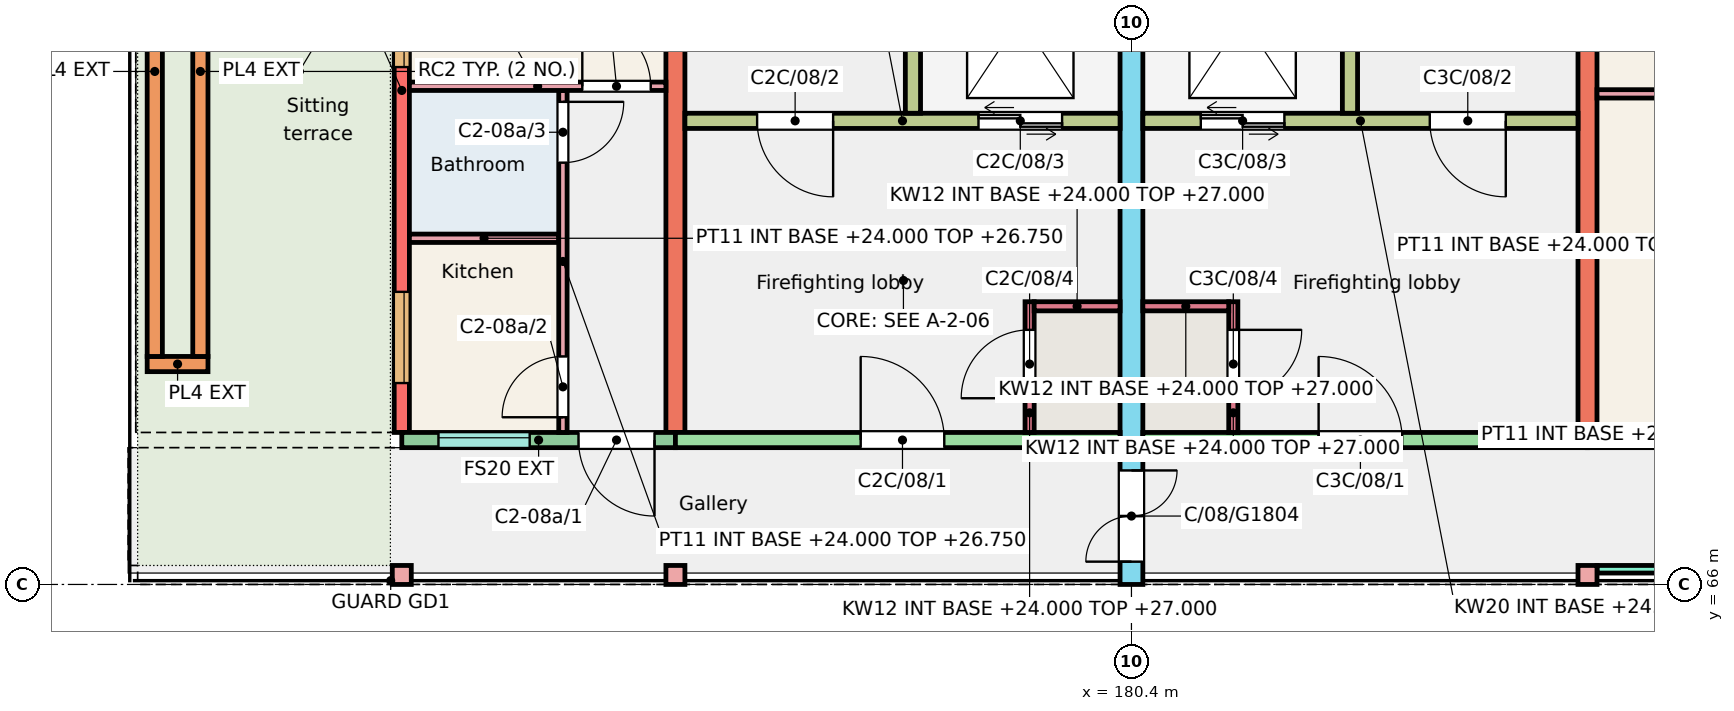
"""IFC4 building model, lengths in metres.
Left out: names, types, materials, properties, quantities, classifications, styles, units other than length and angle.
Written with IfcOpenShell. Run it as: python <this file> out.ifc"""

import sys

from ifc_helpers import new_model, si_unit, direction, frame, frame_2d, origin, origin_2d, place, context, subcontext, project, spatial, rectangle, extrude, element, fill, save


model = new_model("IFC4")
c1 = context("Model", 3, precision=1e-05, world=origin(), true_north=direction((0.0, 1.0)))
c2 = subcontext(c1, "Body", "Model", "MODEL_VIEW")
j1 = project(units=[si_unit("LENGTHUNIT", "METRE"), si_unit("PLANEANGLEUNIT", "RADIAN")], contexts=[c1])
p1 = place(None, origin())
s1 = spatial("IfcSite", under=j1, at=p1, CompositionType="ELEMENT")
p2 = place(p1, origin())
s2 = spatial("IfcBuilding", under=s1, at=p2, CompositionType="ELEMENT")
p3 = place(p2, frame((0.0, 0.0, 24.0)))
s3 = spatial("IfcBuildingStorey", under=s2, at=p3, CompositionType="ELEMENT", Elevation=24.0)
p4 = place(p3, frame((170.8, 68.0, 0.0), z_axis=(0.0, 0.0, 1.0), x_axis=(0.0, 1.0, 0.0)))
e1 = element("IfcWall", 1, at=p4, inside=s3, PredefinedType="SHEAR", context=c2, shape_type="SweptSolid", body=[
    extrude(rectangle(XDim=9.0, YDim=0.2, at=frame_2d((4.5, 0.0))), origin(), (0.0, 0.0, 1.0), 3.0),
])
p5 = place(p4, frame((0.65, 0.0, 0.9)))
e2 = element("IfcOpeningElement", 2, at=p5, cuts=e1, PredefinedType="OPENING", context=c2, shape_type="SweptSolid", body=[
    extrude(rectangle(XDim=1.2, YDim=1.5, at=frame_2d((0.6, 0.75))), frame((0.0, 0.11, 0.0), z_axis=(0.0, -1.0, 0.0), x_axis=(1.0, 0.0, 0.0)), (0.0, 0.0, 1.0), 0.22),
])
p6 = place(p4, frame((4.808, 0.0, 0.9)))
e3 = element("IfcOpeningElement", 3, at=p6, cuts=e1, PredefinedType="OPENING", context=c2, shape_type="SweptSolid", body=[
    extrude(rectangle(XDim=1.2, YDim=1.5, at=frame_2d((0.6, 0.75))), frame((0.0, 0.11, 0.0), z_axis=(0.0, -1.0, 0.0), x_axis=(1.0, 0.0, 0.0)), (0.0, 0.0, 1.0), 0.22),
])
p7 = place(p4, frame((6.305, 0.0, 0.0)))
e4 = element("IfcOpeningElement", 4, at=p7, cuts=e1, PredefinedType="OPENING", context=c2, shape_type="SweptSolid", body=[
    extrude(rectangle(XDim=1.0, YDim=2.1, at=frame_2d((0.5, 1.05))), frame((0.0, 0.11, 0.0), z_axis=(0.0, -1.0, 0.0), x_axis=(1.0, 0.0, 0.0)), (0.0, 0.0, 1.0), 0.22),
])
p8 = place(p3, frame((174.4, 68.0, 0.0), z_axis=(0.0, 0.0, 1.0), x_axis=(0.0, 1.0, 0.0)))
e5 = element("IfcWall", 5, at=p8, inside=s3, PredefinedType="SHEAR", context=c2, shape_type="SweptSolid", body=[
    extrude(rectangle(XDim=9.0, YDim=0.25, at=frame_2d((4.5, 0.0))), origin(), (0.0, 0.0, 1.0), 3.0),
])
p9 = place(p3, frame((180.4, 66.0, 0.0), z_axis=(0.0, 0.0, 1.0), x_axis=(0.0, 1.0, 0.0)))
e6 = element("IfcWall", 6, at=p9, inside=s3, PredefinedType="SHEAR", context=c2, shape_type="SweptSolid", body=[
    extrude(rectangle(XDim=11.0, YDim=0.3, at=frame_2d((5.5, 0.0))), origin(), (0.0, 0.0, 1.0), 3.0),
])
p10 = place(p9, frame((0.3, 0.0, 0.0)))
e7 = element("IfcOpeningElement", 7, at=p10, cuts=e6, PredefinedType="OPENING", context=c2, shape_type="SweptSolid", body=[
    extrude(rectangle(XDim=1.2, YDim=2.1, at=frame_2d((0.6, 1.05))), frame((0.0, 0.16, 0.0), z_axis=(0.0, -1.0, 0.0), x_axis=(1.0, 0.0, 0.0)), (0.0, 0.0, 1.0), 0.32),
])
p11 = place(p3, frame((186.4, 68.0, 0.0), z_axis=(0.0, 0.0, 1.0), x_axis=(0.0, 1.0, 0.0)))
e8 = element("IfcWall", 8, at=p11, inside=s3, PredefinedType="SHEAR", context=c2, shape_type="SweptSolid", body=[
    extrude(rectangle(XDim=9.0, YDim=0.25, at=frame_2d((4.5, 0.0))), origin(), (0.0, 0.0, 1.0), 3.0),
])
p12 = place(p3, frame((170.8, 67.9, 0.0), z_axis=(0.0, 0.0, 1.0), x_axis=(1.0, 0.0, 0.0)))
e9 = element("IfcWall", 9, at=p12, inside=s3, PredefinedType="SOLIDWALL", context=c2, shape_type="SweptSolid", body=[
    extrude(rectangle(XDim=3.6, YDim=0.2, at=frame_2d((1.8, 0.0))), origin(), (0.0, 0.0, 1.0), 3.0),
])
p13 = place(p12, frame((0.482, 0.0, 1.1)))
e10 = element("IfcOpeningElement", 10, at=p13, cuts=e9, PredefinedType="OPENING", context=c2, shape_type="SweptSolid", body=[
    extrude(rectangle(XDim=1.2, YDim=1.3, at=frame_2d((0.6, 0.65))), frame((0.0, 0.11, 0.0), z_axis=(0.0, -1.0, 0.0), x_axis=(1.0, 0.0, 0.0)), (0.0, 0.0, 1.0), 0.22),
])
p14 = place(p12, frame((2.325, 0.0, 0.0)))
e11 = element("IfcOpeningElement", 11, at=p14, cuts=e9, PredefinedType="OPENING", context=c2, shape_type="SweptSolid", body=[
    extrude(rectangle(XDim=1.0, YDim=2.1, at=frame_2d((0.5, 1.05))), frame((0.0, 0.11, 0.0), z_axis=(0.0, -1.0, 0.0), x_axis=(1.0, 0.0, 0.0)), (0.0, 0.0, 1.0), 0.22),
])
p15 = place(p3, frame((174.4, 67.9, 0.0), z_axis=(0.0, 0.0, 1.0), x_axis=(1.0, 0.0, 0.0)))
e12 = element("IfcWall", 12, at=p15, inside=s3, PredefinedType="SHEAR", context=c2, shape_type="SweptSolid", body=[
    extrude(rectangle(XDim=5.85, YDim=0.2, at=frame_2d((2.925, 0.0))), origin(), (0.0, 0.0, 1.0), 3.0),
])
p16 = place(p15, frame((2.438, 0.0, 0.0)))
e13 = element("IfcOpeningElement", 13, at=p16, cuts=e12, PredefinedType="OPENING", context=c2, shape_type="SweptSolid", body=[
    extrude(rectangle(XDim=1.1, YDim=2.1, at=frame_2d((0.55, 1.05))), frame((0.0, 0.11, 0.0), z_axis=(0.0, -1.0, 0.0), x_axis=(1.0, 0.0, 0.0)), (0.0, 0.0, 1.0), 0.22),
])
p17 = place(p3, frame((174.525, 72.1, 0.0), z_axis=(0.0, 0.0, 1.0), x_axis=(1.0, 0.0, 0.0)))
e14 = element("IfcWall", 14, at=p17, inside=s3, PredefinedType="SHEAR", context=c2, shape_type="SweptSolid", body=[
    extrude(rectangle(XDim=5.725, YDim=0.2, at=frame_2d((2.863, 0.0))), origin(), (0.0, 0.0, 1.0), 3.0),
])
p18 = place(p17, frame((0.95, 0.0, 0.0)))
e15 = element("IfcOpeningElement", 15, at=p18, cuts=e14, PredefinedType="OPENING", context=c2, shape_type="SweptSolid", body=[
    extrude(rectangle(XDim=1.0, YDim=2.1, at=frame_2d((0.5, 1.05))), frame((0.0, 0.11, 0.0), z_axis=(0.0, -1.0, 0.0), x_axis=(1.0, 0.0, 0.0)), (0.0, 0.0, 1.0), 0.22),
])
p19 = place(p17, frame((3.863, 0.0, 0.0)))
e16 = element("IfcOpeningElement", 16, at=p19, cuts=e14, PredefinedType="OPENING", context=c2, shape_type="SweptSolid", body=[
    extrude(rectangle(XDim=1.1, YDim=2.1, at=frame_2d((0.55, 1.05))), frame((0.0, 0.11, 0.0), z_axis=(0.0, -1.0, 0.0), x_axis=(1.0, 0.0, 0.0)), (0.0, 0.0, 1.0), 0.22),
])
p20 = place(p3, frame((177.525, 72.2, 0.0), z_axis=(0.0, 0.0, 1.0), x_axis=(0.0, 1.0, 0.0)))
e17 = element("IfcWall", 17, at=p20, inside=s3, PredefinedType="SHEAR", context=c2, shape_type="SweptSolid", body=[
    extrude(rectangle(XDim=4.8, YDim=0.2, at=frame_2d((2.4, 0.0))), origin(), (0.0, 0.0, 1.0), 3.0),
])
p21 = place(p3, frame((179.06, 68.0, 0.0), z_axis=(0.0, 0.0, 1.0), x_axis=(0.0, 1.0, 0.0)))
e18 = element("IfcWall", 18, at=p21, inside=s3, PredefinedType="SHEAR", context=c2, shape_type="SweptSolid", body=[
    extrude(rectangle(XDim=1.72, YDim=0.12, at=frame_2d((0.86, 0.0))), origin(), (0.0, 0.0, 1.0), 3.0),
])
p22 = place(p21, frame((0.45, 0.0, 0.0)))
e19 = element("IfcOpeningElement", 19, at=p22, cuts=e18, PredefinedType="OPENING", context=c2, shape_type="SweptSolid", body=[
    extrude(rectangle(XDim=0.9, YDim=2.1, at=frame_2d((0.45, 1.05))), frame((0.0, 0.07, 0.0), z_axis=(0.0, -1.0, 0.0), x_axis=(1.0, 0.0, 0.0)), (0.0, 0.0, 1.0), 0.14),
])
p23 = place(p3, frame((179.12, 69.66, 0.0), z_axis=(0.0, 0.0, 1.0), x_axis=(1.0, 0.0, 0.0)))
e20 = element("IfcWall", 20, at=p23, inside=s3, PredefinedType="SHEAR", context=c2, shape_type="SweptSolid", body=[
    extrude(rectangle(XDim=1.13, YDim=0.12, at=frame_2d((0.565, 0.0))), origin(), (0.0, 0.0, 1.0), 3.0),
])
p24 = place(p3, frame((180.55, 67.9, 0.0), z_axis=(0.0, 0.0, 1.0), x_axis=(1.0, 0.0, 0.0)))
e21 = element("IfcWall", 21, at=p24, inside=s3, PredefinedType="SHEAR", context=c2, shape_type="SweptSolid", body=[
    extrude(rectangle(XDim=5.85, YDim=0.2, at=frame_2d((2.925, 0.0))), origin(), (0.0, 0.0, 1.0), 3.0),
])
p25 = place(p24, frame((2.312, 0.0, 0.0)))
e22 = element("IfcOpeningElement", 22, at=p25, cuts=e21, PredefinedType="OPENING", context=c2, shape_type="SweptSolid", body=[
    extrude(rectangle(XDim=1.1, YDim=2.1, at=frame_2d((0.55, 1.05))), frame((0.0, 0.11, 0.0), z_axis=(0.0, -1.0, 0.0), x_axis=(1.0, 0.0, 0.0)), (0.0, 0.0, 1.0), 0.22),
])
p26 = place(p3, frame((180.55, 72.1, 0.0), z_axis=(0.0, 0.0, 1.0), x_axis=(1.0, 0.0, 0.0)))
e23 = element("IfcWall", 23, at=p26, inside=s3, PredefinedType="SHEAR", context=c2, shape_type="SweptSolid", body=[
    extrude(rectangle(XDim=5.725, YDim=0.2, at=frame_2d((2.862, 0.0))), origin(), (0.0, 0.0, 1.0), 3.0),
])
p27 = place(p26, frame((3.775, 0.0, 0.0)))
e24 = element("IfcOpeningElement", 24, at=p27, cuts=e23, PredefinedType="OPENING", context=c2, shape_type="SweptSolid", body=[
    extrude(rectangle(XDim=1.0, YDim=2.1, at=frame_2d((0.5, 1.05))), frame((0.0, 0.11, 0.0), z_axis=(0.0, -1.0, 0.0), x_axis=(1.0, 0.0, 0.0)), (0.0, 0.0, 1.0), 0.22),
])
p28 = place(p26, frame((0.762, 0.0, 0.0)))
e25 = element("IfcOpeningElement", 25, at=p28, cuts=e23, PredefinedType="OPENING", context=c2, shape_type="SweptSolid", body=[
    extrude(rectangle(XDim=1.1, YDim=2.1, at=frame_2d((0.55, 1.05))), frame((0.0, 0.11, 0.0), z_axis=(0.0, -1.0, 0.0), x_axis=(1.0, 0.0, 0.0)), (0.0, 0.0, 1.0), 0.22),
])
p29 = place(p3, frame((183.275, 72.2, 0.0), z_axis=(0.0, 0.0, 1.0), x_axis=(0.0, 1.0, 0.0)))
e26 = element("IfcWall", 26, at=p29, inside=s3, PredefinedType="SHEAR", context=c2, shape_type="SweptSolid", body=[
    extrude(rectangle(XDim=4.8, YDim=0.2, at=frame_2d((2.4, 0.0))), origin(), (0.0, 0.0, 1.0), 3.0),
])
p30 = place(p3, frame((181.74, 68.0, 0.0), z_axis=(0.0, 0.0, 1.0), x_axis=(0.0, 1.0, 0.0)))
e27 = element("IfcWall", 27, at=p30, inside=s3, PredefinedType="SHEAR", context=c2, shape_type="SweptSolid", body=[
    extrude(rectangle(XDim=1.72, YDim=0.12, at=frame_2d((0.86, 0.0))), origin(), (0.0, 0.0, 1.0), 3.0),
])
p31 = place(p30, frame((0.45, 0.0, 0.0)))
e28 = element("IfcOpeningElement", 28, at=p31, cuts=e27, PredefinedType="OPENING", context=c2, shape_type="SweptSolid", body=[
    extrude(rectangle(XDim=0.9, YDim=2.1, at=frame_2d((0.45, 1.05))), frame((0.0, 0.07, 0.0), z_axis=(0.0, -1.0, 0.0), x_axis=(1.0, 0.0, 0.0)), (0.0, 0.0, 1.0), 0.14),
])
p32 = place(p3, frame((180.55, 69.66, 0.0), z_axis=(0.0, 0.0, 1.0), x_axis=(1.0, 0.0, 0.0)))
e29 = element("IfcWall", 29, at=p32, inside=s3, PredefinedType="SHEAR", context=c2, shape_type="SweptSolid", body=[
    extrude(rectangle(XDim=1.13, YDim=0.12, at=frame_2d((0.565, 0.0))), origin(), (0.0, 0.0, 1.0), 3.0),
])
p33 = place(p3, frame((186.4, 67.9, 0.0), z_axis=(0.0, 0.0, 1.0), x_axis=(1.0, 0.0, 0.0)))
e30 = element("IfcWall", 30, at=p33, inside=s3, PredefinedType="SOLIDWALL", context=c2, shape_type="SweptSolid", body=[
    extrude(rectangle(XDim=3.6, YDim=0.2, at=frame_2d((1.8, 0.0))), origin(), (0.0, 0.0, 1.0), 3.0),
])
p34 = place(p33, frame((1.062, 0.0, 0.9)))
e31 = element("IfcOpeningElement", 31, at=p34, cuts=e30, PredefinedType="OPENING", context=c2, shape_type="SweptSolid", body=[
    extrude(rectangle(XDim=1.5, YDim=1.5, at=frame_2d((0.75, 0.75))), frame((0.0, 0.11, 0.0), z_axis=(0.0, -1.0, 0.0), x_axis=(1.0, 0.0, 0.0)), (0.0, 0.0, 1.0), 0.22),
])
for number, where, z_axis, x_axis in (
    (32, (170.8, 66.125, 0.0), (0.0, 0.0, 1.0), (1.0, 0.0, 0.0)),
    (33, (174.4, 66.125, 0.0), (0.0, 0.0, 1.0), (1.0, 0.0, 0.0)),
    (34, (186.4, 66.125, 0.0), (0.0, 0.0, 1.0), (1.0, 0.0, 0.0)),
):
    element("IfcColumn", number, at=place(p3, frame(where, z_axis=z_axis, x_axis=x_axis)), inside=s3, PredefinedType="COLUMN", context=c2, shape_type="SweptSolid", body=[
        extrude(rectangle(XDim=0.25, YDim=0.25, at=origin_2d()), origin(), (0.0, 0.0, 1.0), 3.0),
    ])
p35 = place(p3, frame((167.45, 68.9, 0.01), z_axis=(0.0, 0.0, 1.0), x_axis=(1.0, 0.0, 0.0)))
e35 = element("IfcWall", 35, at=p35, inside=s3, PredefinedType="SOLIDWALL", context=c2, shape_type="SweptSolid", body=[
    extrude(rectangle(XDim=0.8, YDim=0.2, at=frame_2d((0.4, 0.0))), origin(), (0.0, 0.0, 1.0), 0.45),
])
for number, where, z_axis, x_axis in (
    (36, (167.55, 69.0, 0.01), (0.0, 0.0, 1.0), (0.0, 1.0, 0.0)),
    (37, (168.15, 69.0, 0.01), (0.0, 0.0, 1.0), (0.0, 1.0, 0.0)),
):
    element("IfcWall", number, at=place(p3, frame(where, z_axis=z_axis, x_axis=x_axis)), inside=s3, PredefinedType="SOLIDWALL", context=c2, shape_type="SweptSolid", body=[
        extrude(rectangle(XDim=7.5, YDim=0.2, at=frame_2d((3.75, 0.0))), origin(), (0.0, 0.0, 1.0), 0.45),
    ])
p36 = place(p3, frame((186.525, 66.2, 0.0), z_axis=(0.0, 0.0, 1.0), x_axis=(1.0, 0.0, 0.0)))
e38 = element("IfcWall", 38, at=p36, inside=s3, PredefinedType="SOLIDWALL", context=c2, shape_type="SweptSolid", body=[
    extrude(rectangle(XDim=3.35, YDim=0.1, at=frame_2d((1.675, 0.0))), origin(), (0.0, 0.0, 1.0), 2.45),
])
p37 = place(p3, frame((170.9, 70.555, 0.0), z_axis=(0.0, 0.0, 1.0), x_axis=(1.0, 0.0, 0.0)))
e39 = element("IfcWall", 39, at=p37, inside=s3, PredefinedType="PARTITIONING", context=c2, shape_type="SweptSolid", body=[
    extrude(rectangle(XDim=1.965, YDim=0.11, at=frame_2d((0.982, 0.0))), origin(), (0.0, 0.0, 1.0), 2.75),
])
p38 = place(p3, frame((172.92, 68.0, 0.0), z_axis=(0.0, 0.0, 1.0), x_axis=(0.0, 1.0, 0.0)))
e40 = element("IfcWall", 40, at=p38, inside=s3, PredefinedType="PARTITIONING", context=c2, shape_type="SweptSolid", body=[
    extrude(rectangle(XDim=4.5, YDim=0.11, at=frame_2d((2.25, 0.0))), origin(), (0.0, 0.0, 1.0), 2.75),
])
p39 = place(p38, frame((0.2, 0.0, 0.0)))
e41 = element("IfcOpeningElement", 41, at=p39, cuts=e40, PredefinedType="OPENING", context=c2, shape_type="SweptSolid", body=[
    extrude(rectangle(XDim=0.8, YDim=2.1, at=frame_2d((0.4, 1.05))), frame((0.0, 0.065, 0.0), z_axis=(0.0, -1.0, 0.0), x_axis=(1.0, 0.0, 0.0)), (0.0, 0.0, 1.0), 0.13),
])
p40 = place(p38, frame((3.55, 0.0, 0.0)))
e42 = element("IfcOpeningElement", 42, at=p40, cuts=e40, PredefinedType="OPENING", context=c2, shape_type="SweptSolid", body=[
    extrude(rectangle(XDim=0.8, YDim=2.1, at=frame_2d((0.4, 1.05))), frame((0.0, 0.065, 0.0), z_axis=(0.0, -1.0, 0.0), x_axis=(1.0, 0.0, 0.0)), (0.0, 0.0, 1.0), 0.13),
])
p41 = place(p3, frame((170.9, 72.555, 0.0), z_axis=(0.0, 0.0, 1.0), x_axis=(1.0, 0.0, 0.0)))
e43 = element("IfcWall", 43, at=p41, inside=s3, PredefinedType="PARTITIONING", context=c2, shape_type="SweptSolid", body=[
    extrude(rectangle(XDim=3.375, YDim=0.11, at=frame_2d((1.688, 0.0))), origin(), (0.0, 0.0, 1.0), 2.75),
])
p42 = place(p41, frame((2.275, 0.0, 0.0)))
e44 = element("IfcOpeningElement", 44, at=p42, cuts=e43, PredefinedType="OPENING", context=c2, shape_type="SweptSolid", body=[
    extrude(rectangle(XDim=0.9, YDim=2.1, at=frame_2d((0.45, 1.05))), frame((0.0, 0.065, 0.0), z_axis=(0.0, -1.0, 0.0), x_axis=(1.0, 0.0, 0.0)), (0.0, 0.0, 1.0), 0.13),
])
p43 = place(p3, frame((186.525, 72.455, 0.0), z_axis=(0.0, 0.0, 1.0), x_axis=(1.0, 0.0, 0.0)))
e45 = element("IfcWall", 45, at=p43, inside=s3, PredefinedType="PARTITIONING", context=c2, shape_type="SweptSolid", body=[
    extrude(rectangle(XDim=3.375, YDim=0.11, at=frame_2d((1.688, 0.0))), origin(), (0.0, 0.0, 1.0), 2.8),
])
p44 = place(p13, origin())
e46 = element("IfcWindow", 46, at=p44, inside=s3, PartitioningType="SINGLE_PANEL", PredefinedType="WINDOW", context=c2, shape_type="SweptSolid", body=[
    extrude(rectangle(XDim=1.2, YDim=1.3, at=frame_2d((0.6, 0.65))), frame((0.0, 0.06, 0.0), z_axis=(0.0, -1.0, 0.0), x_axis=(1.0, 0.0, 0.0)), (0.0, 0.0, 1.0), 0.06),
])
fill(e10, e46)
p45 = place(p5, origin())
e47 = element("IfcWindow", 47, at=p45, inside=s3, PartitioningType="SINGLE_PANEL", PredefinedType="WINDOW", context=c2, shape_type="SweptSolid", body=[
    extrude(rectangle(XDim=1.2, YDim=1.5, at=frame_2d((0.6, 0.75))), frame((0.0, 0.0, 0.0), z_axis=(0.0, -1.0, 0.0), x_axis=(1.0, 0.0, 0.0)), (0.0, 0.0, 1.0), 0.06),
])
fill(e2, e47)
p46 = place(p6, origin())
e48 = element("IfcWindow", 48, at=p46, inside=s3, PartitioningType="SINGLE_PANEL", PredefinedType="WINDOW", context=c2, shape_type="SweptSolid", body=[
    extrude(rectangle(XDim=1.2, YDim=1.5, at=frame_2d((0.6, 0.75))), frame((0.0, 0.0, 0.0), z_axis=(0.0, -1.0, 0.0), x_axis=(1.0, 0.0, 0.0)), (0.0, 0.0, 1.0), 0.06),
])
fill(e3, e48)
p47 = place(p14, origin())
e49 = element("IfcDoor", 49, at=p47, inside=s3, OperationType="SINGLE_SWING_RIGHT", PredefinedType="DOOR", context=c2, shape_type="SweptSolid", body=[
    extrude(rectangle(XDim=1.0, YDim=2.1, at=frame_2d((0.5, 1.05))), frame((0.0, 0.025, 0.0), z_axis=(0.0, -1.0, 0.0), x_axis=(1.0, 0.0, 0.0)), (0.0, 0.0, 1.0), 0.05),
])
fill(e11, e49)
p48 = place(p39, origin())
e50 = element("IfcDoor", 50, at=p48, inside=s3, OperationType="SINGLE_SWING_LEFT", PredefinedType="DOOR", context=c2, shape_type="SweptSolid", body=[
    extrude(rectangle(XDim=0.8, YDim=2.1, at=frame_2d((0.4, 1.05))), frame((0.0, 0.025, 0.0), z_axis=(0.0, -1.0, 0.0), x_axis=(1.0, 0.0, 0.0)), (0.0, 0.0, 1.0), 0.05),
])
fill(e41, e50)
p49 = place(p40, origin())
e51 = element("IfcDoor", 51, at=p49, inside=s3, OperationType="SINGLE_SWING_RIGHT", PredefinedType="DOOR", context=c2, shape_type="SweptSolid", body=[
    extrude(rectangle(XDim=0.8, YDim=2.1, at=frame_2d((0.4, 1.05))), frame((0.0, 0.025, 0.0), z_axis=(0.0, -1.0, 0.0), x_axis=(1.0, 0.0, 0.0)), (0.0, 0.0, 1.0), 0.05),
])
fill(e42, e51)
p50 = place(p42, origin())
e52 = element("IfcDoor", 52, at=p50, inside=s3, OperationType="SINGLE_SWING_LEFT", PredefinedType="DOOR", context=c2, shape_type="SweptSolid", body=[
    extrude(rectangle(XDim=0.9, YDim=2.1, at=frame_2d((0.45, 1.05))), frame((0.0, 0.025, 0.0), z_axis=(0.0, -1.0, 0.0), x_axis=(1.0, 0.0, 0.0)), (0.0, 0.0, 1.0), 0.05),
])
fill(e44, e52)
p51 = place(p16, origin())
e53 = element("IfcDoor", 53, at=p51, inside=s3, OperationType="SINGLE_SWING_LEFT", PredefinedType="DOOR", context=c2, shape_type="SweptSolid", body=[
    extrude(rectangle(XDim=1.1, YDim=2.1, at=frame_2d((0.55, 1.05))), frame((0.0, 0.025, 0.0), z_axis=(0.0, -1.0, 0.0), x_axis=(1.0, 0.0, 0.0)), (0.0, 0.0, 1.0), 0.05),
])
fill(e13, e53)
p52 = place(p18, origin())
e54 = element("IfcDoor", 54, at=p52, inside=s3, OperationType="SINGLE_SWING_RIGHT", PredefinedType="DOOR", context=c2, shape_type="SweptSolid", body=[
    extrude(rectangle(XDim=1.0, YDim=2.1, at=frame_2d((0.5, 1.05))), frame((0.0, 0.025, 0.0), z_axis=(0.0, -1.0, 0.0), x_axis=(1.0, 0.0, 0.0)), (0.0, 0.0, 1.0), 0.05),
])
fill(e15, e54)
p53 = place(p19, origin())
e55 = element("IfcDoor", 55, at=p53, inside=s3, OperationType="DOUBLE_DOOR_SLIDING", PredefinedType="DOOR", context=c2, shape_type="SweptSolid", body=[
    extrude(rectangle(XDim=1.1, YDim=2.1, at=frame_2d((0.55, 1.05))), frame((0.0, 0.025, 0.0), z_axis=(0.0, -1.0, 0.0), x_axis=(1.0, 0.0, 0.0)), (0.0, 0.0, 1.0), 0.05),
])
fill(e16, e55)
p54 = place(p22, origin())
e56 = element("IfcDoor", 56, at=p54, inside=s3, OperationType="SINGLE_SWING_LEFT", PredefinedType="DOOR", context=c2, shape_type="SweptSolid", body=[
    extrude(rectangle(XDim=0.9, YDim=2.1, at=frame_2d((0.45, 1.05))), frame((0.0, 0.025, 0.0), z_axis=(0.0, -1.0, 0.0), x_axis=(1.0, 0.0, 0.0)), (0.0, 0.0, 1.0), 0.05),
])
fill(e19, e56)
p55 = place(p25, origin())
e57 = element("IfcDoor", 57, at=p55, inside=s3, OperationType="SINGLE_SWING_LEFT", PredefinedType="DOOR", context=c2, shape_type="SweptSolid", body=[
    extrude(rectangle(XDim=1.1, YDim=2.1, at=frame_2d((0.55, 1.05))), frame((0.0, 0.025, 0.0), z_axis=(0.0, -1.0, 0.0), x_axis=(1.0, 0.0, 0.0)), (0.0, 0.0, 1.0), 0.05),
])
fill(e22, e57)
p56 = place(p27, origin())
e58 = element("IfcDoor", 58, at=p56, inside=s3, OperationType="SINGLE_SWING_RIGHT", PredefinedType="DOOR", context=c2, shape_type="SweptSolid", body=[
    extrude(rectangle(XDim=1.0, YDim=2.1, at=frame_2d((0.5, 1.05))), frame((0.0, 0.025, 0.0), z_axis=(0.0, -1.0, 0.0), x_axis=(1.0, 0.0, 0.0)), (0.0, 0.0, 1.0), 0.05),
])
fill(e24, e58)
p57 = place(p28, origin())
e59 = element("IfcDoor", 59, at=p57, inside=s3, OperationType="DOUBLE_DOOR_SLIDING", PredefinedType="DOOR", context=c2, shape_type="SweptSolid", body=[
    extrude(rectangle(XDim=1.1, YDim=2.1, at=frame_2d((0.55, 1.05))), frame((0.0, 0.025, 0.0), z_axis=(0.0, -1.0, 0.0), x_axis=(1.0, 0.0, 0.0)), (0.0, 0.0, 1.0), 0.05),
])
fill(e25, e59)
p58 = place(p31, origin())
e60 = element("IfcDoor", 60, at=p58, inside=s3, OperationType="SINGLE_SWING_RIGHT", PredefinedType="DOOR", context=c2, shape_type="SweptSolid", body=[
    extrude(rectangle(XDim=0.9, YDim=2.1, at=frame_2d((0.45, 1.05))), frame((0.0, 0.025, 0.0), z_axis=(0.0, -1.0, 0.0), x_axis=(1.0, 0.0, 0.0)), (0.0, 0.0, 1.0), 0.05),
])
fill(e28, e60)
p59 = place(p10, origin())
e61 = element("IfcDoor", 61, at=p59, inside=s3, OperationType="DOUBLE_DOOR_SINGLE_SWING", PredefinedType="DOOR", context=c2, shape_type="SweptSolid", body=[
    extrude(rectangle(XDim=1.2, YDim=2.1, at=frame_2d((0.6, 1.05))), frame((0.0, 0.025, 0.0), z_axis=(0.0, -1.0, 0.0), x_axis=(1.0, 0.0, 0.0)), (0.0, 0.0, 1.0), 0.05),
])
fill(e7, e61)
save(model, sys.argv[1])
